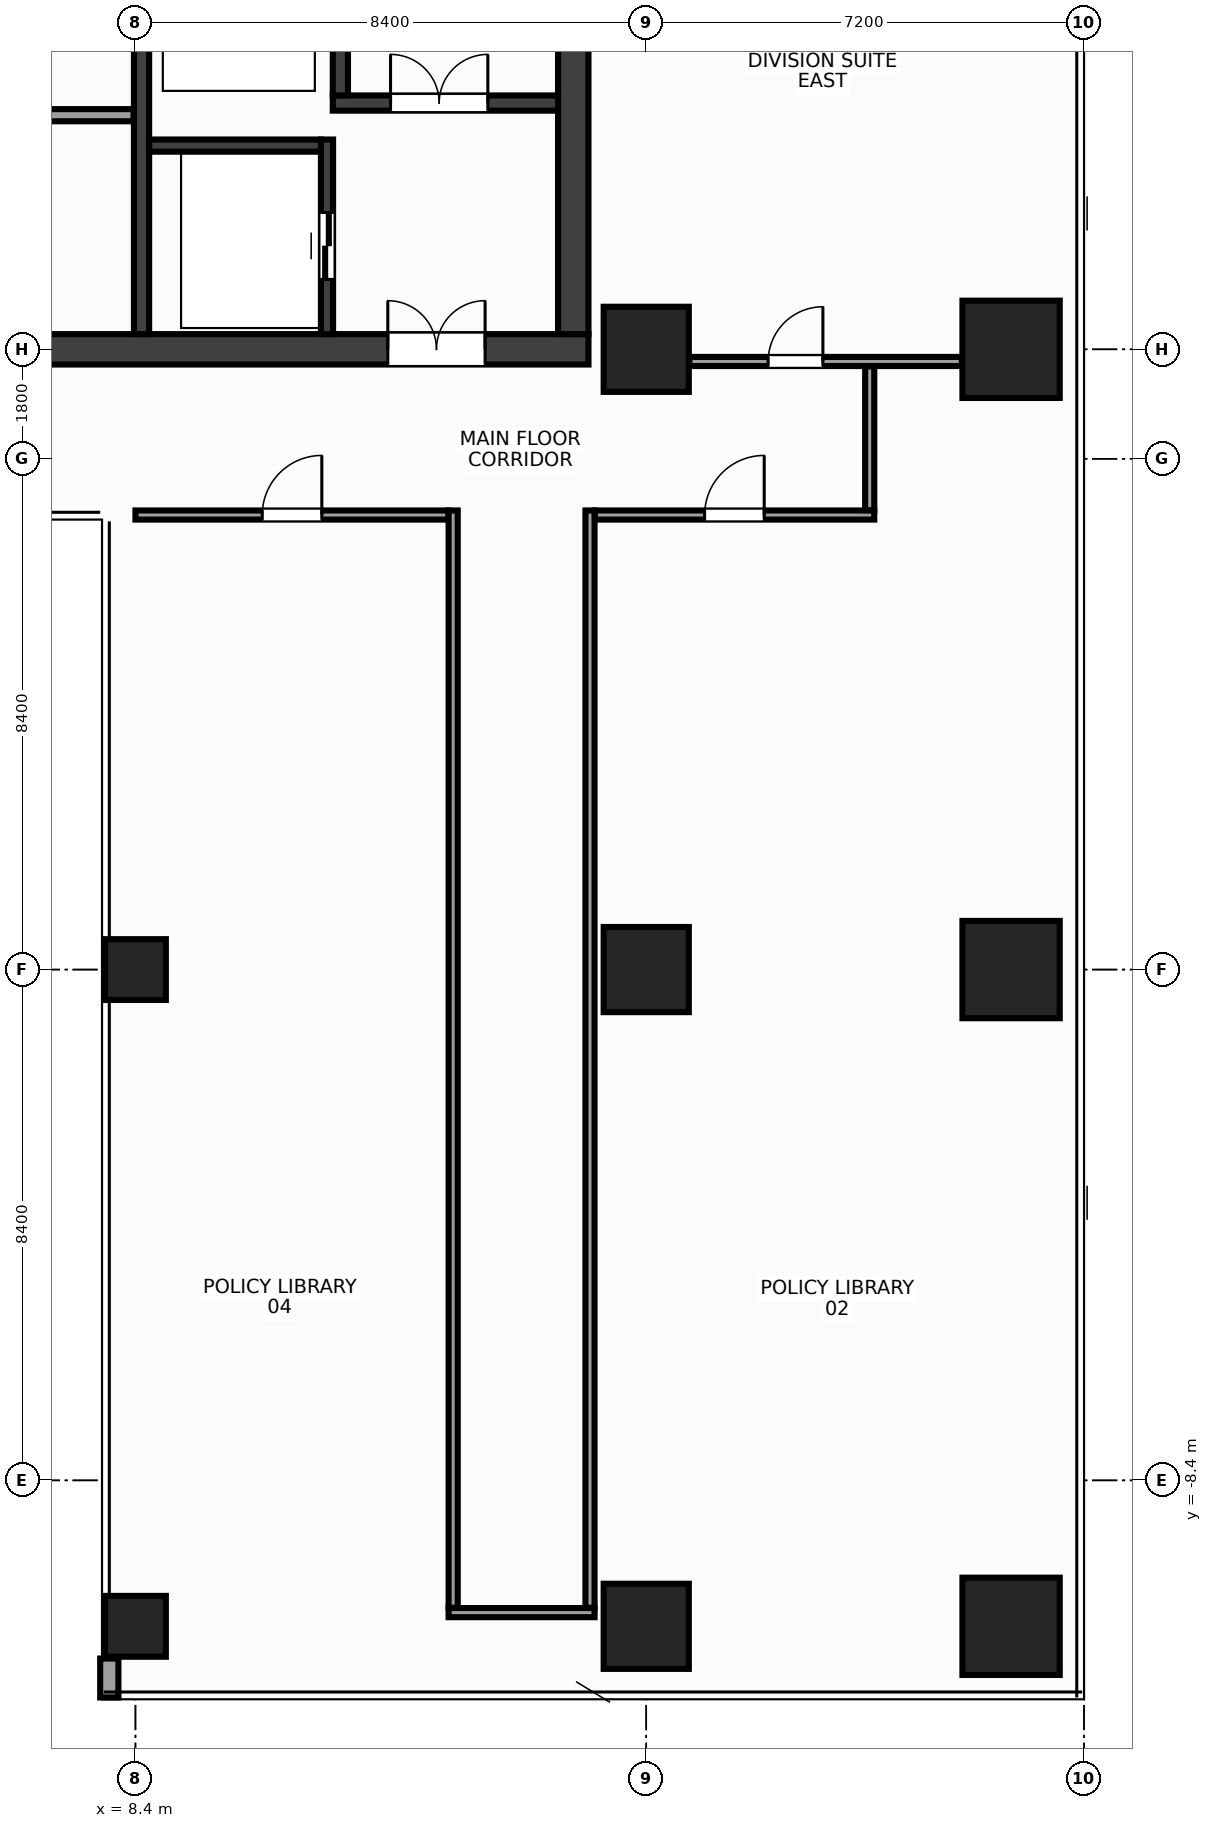
"""IFC4 building model, lengths in metres.
Left out: names, types, materials, properties, quantities, classifications, styles, units other than length and angle.
Written with IfcOpenShell. Run it as: python <this file> out.ifc"""

import sys

from ifc_helpers import new_model, si_unit, direction, frame, frame_2d, origin, origin_2d, place, context, subcontext, project, spatial, rectangle, hollow_rectangle, extrude, source, transform, mapped, element, fill, save


model = new_model("IFC4")
c1 = context("Model", 3, precision=1e-05, world=origin(), true_north=direction((0.0, 1.0)))
c2 = subcontext(c1, "Body", "Model", "MODEL_VIEW")
j1 = project(units=[si_unit("LENGTHUNIT", "METRE"), si_unit("PLANEANGLEUNIT", "RADIAN")], contexts=[c1])
p1 = place(None, origin())
s1 = spatial("IfcSite", under=j1, at=p1, CompositionType="ELEMENT")
p2 = place(p1, origin())
s2 = spatial("IfcBuilding", under=s1, at=p2, CompositionType="ELEMENT")
p3 = place(p2, frame((0.0, 0.0, 214.4)))
s3 = spatial("IfcBuildingStorey", under=s2, at=p3, CompositionType="ELEMENT", Elevation=214.4)
m1 = source(origin(), c2, "Body", "SweptSolid", [
    extrude(rectangle(XDim=31.7, YDim=0.5, at=frame_2d((15.85, 0.0))), origin(), (0.0, 0.0, 1.0), 3.6),
])
p4 = place(p3, frame((-15.85, 10.2, 0.0), z_axis=(0.0, 0.0, 1.0), x_axis=(1.0, 0.0, 0.0)))
e1 = element("IfcWall", 1, at=p4, inside=s3, PredefinedType="SHEAR", context=c2, shape_type="MappedRepresentation", body=[
    mapped(m1, transform((0.0, 0.0, 0.0), x_axis=(1.0, 0.0, 0.0), y_axis=(0.0, 1.0, 0.0), z_axis=(0.0, 0.0, 1.0), scale=1.0)),
])
p5 = place(p4, frame((1.7, 0.0, 0.0)))
e2 = element("IfcOpeningElement", 2, at=p5, cuts=e1, PredefinedType="OPENING", context=c2, shape_type="SweptSolid", body=[
    extrude(rectangle(XDim=1.6, YDim=2.15, at=frame_2d((0.8, 1.075))), frame((0.0, 0.262, 0.0), z_axis=(0.0, -1.0, 0.0), x_axis=(1.0, 0.0, 0.0)), (0.0, 0.0, 1.0), 0.524),
])
p6 = place(p4, frame((28.4, 0.0, 0.0)))
e3 = element("IfcOpeningElement", 3, at=p6, cuts=e1, PredefinedType="OPENING", context=c2, shape_type="SweptSolid", body=[
    extrude(rectangle(XDim=1.6, YDim=2.15, at=frame_2d((0.8, 1.075))), frame((0.0, 0.262, 0.0), z_axis=(0.0, -1.0, 0.0), x_axis=(1.0, 0.0, 0.0)), (0.0, 0.0, 1.0), 0.524),
])
p7 = place(p4, frame((15.1, 0.0, 0.0)))
e4 = element("IfcOpeningElement", 4, at=p7, cuts=e1, PredefinedType="OPENING", context=c2, shape_type="SweptSolid", body=[
    extrude(rectangle(XDim=1.5, YDim=2.2, at=frame_2d((0.75, 1.1))), frame((0.0, 0.262, 0.0), z_axis=(0.0, -1.0, 0.0), x_axis=(1.0, 0.0, 0.0)), (0.0, 0.0, 1.0), 0.524),
])
m2 = source(origin(), c2, "Body", "SweptSolid", [
    extrude(rectangle(XDim=13.1, YDim=0.5, at=frame_2d((6.55, 0.0))), origin(), (0.0, 0.0, 1.0), 3.6),
])
p8 = place(p3, frame((15.6, 10.45, 0.0), z_axis=(0.0, 0.0, 1.0), x_axis=(0.0, 1.0, 0.0)))
e5 = element("IfcWall", 5, at=p8, inside=s3, PredefinedType="SHEAR", context=c2, shape_type="MappedRepresentation", body=[
    mapped(m2, transform((0.0, 0.0, 0.0), x_axis=(1.0, 0.0, 0.0), y_axis=(0.0, 1.0, 0.0), z_axis=(0.0, 0.0, 1.0), scale=1.0)),
])
m3 = source(origin(), c2, "Body", "SweptSolid", [
    extrude(rectangle(XDim=13.1, YDim=0.25, at=frame_2d((6.55, 0.0))), origin(), (0.0, 0.0, 1.0), 3.6),
])
p9 = place(p3, frame((8.5, 10.45, 0.0), z_axis=(0.0, 0.0, 1.0), x_axis=(0.0, 1.0, 0.0)))
e6 = element("IfcWall", 6, at=p9, inside=s3, PredefinedType="SHEAR", context=c2, shape_type="MappedRepresentation", body=[
    mapped(m3, transform((0.0, 0.0, 0.0), x_axis=(1.0, 0.0, 0.0), y_axis=(0.0, 1.0, 0.0), z_axis=(0.0, 0.0, 1.0), scale=1.0)),
])
p10 = place(p9, frame((10.0, 0.0, 0.0)))
e7 = element("IfcOpeningElement", 7, at=p10, cuts=e6, PredefinedType="OPENING", context=c2, shape_type="SweptSolid", body=[
    extrude(rectangle(XDim=0.95, YDim=2.15, at=frame_2d((0.475, 1.075))), frame((0.0, 0.137, 0.0), z_axis=(0.0, -1.0, 0.0), x_axis=(1.0, 0.0, 0.0)), (0.0, 0.0, 1.0), 0.274),
])
m4 = source(origin(), c2, "Body", "SweptSolid", [
    extrude(rectangle(XDim=3.705, YDim=0.25, at=frame_2d((1.853, 0.0))), origin(), (0.0, 0.0, 1.0), 3.6),
])
p11 = place(p3, frame((11.645, 14.25, 0.0), z_axis=(0.0, 0.0, 1.0), x_axis=(1.0, 0.0, 0.0)))
e8 = element("IfcWall", 8, at=p11, inside=s3, PredefinedType="SHEAR", context=c2, shape_type="MappedRepresentation", body=[
    mapped(m4, transform((0.0, 0.0, 0.0), x_axis=(1.0, 0.0, 0.0), y_axis=(0.0, 1.0, 0.0), z_axis=(0.0, 0.0, 1.0), scale=1.0)),
])
p12 = place(p11, frame((0.95, 0.0, 0.0)))
e9 = element("IfcOpeningElement", 9, at=p12, cuts=e8, PredefinedType="OPENING", context=c2, shape_type="SweptSolid", body=[
    extrude(rectangle(XDim=1.6, YDim=2.15, at=frame_2d((0.8, 1.075))), frame((0.0, 0.137, 0.0), z_axis=(0.0, -1.0, 0.0), x_axis=(1.0, 0.0, 0.0)), (0.0, 0.0, 1.0), 0.274),
])
m5 = source(origin(), c2, "Body", "SweptSolid", [
    extrude(rectangle(XDim=9.175, YDim=0.25, at=frame_2d((4.587, 0.0))), origin(), (0.0, 0.0, 1.0), 3.6),
])
p13 = place(p3, frame((11.77, 14.375, 0.0), z_axis=(0.0, 0.0, 1.0), x_axis=(0.0, 1.0, 0.0)))
e10 = element("IfcWall", 10, at=p13, inside=s3, PredefinedType="SHEAR", context=c2, shape_type="MappedRepresentation", body=[
    mapped(m5, transform((0.0, 0.0, 0.0), x_axis=(1.0, 0.0, 0.0), y_axis=(0.0, 1.0, 0.0), z_axis=(0.0, 0.0, 1.0), scale=1.0)),
])
m6 = source(origin(), c2, "Body", "SweptSolid", [
    extrude(rectangle(XDim=3.2, YDim=0.2, at=frame_2d((1.6, 0.0))), origin(), (0.0, 0.0, 1.0), 3.6),
])
p14 = place(p3, frame((11.55, 10.45, 0.0), z_axis=(0.0, 0.0, 1.0), x_axis=(0.0, 1.0, 0.0)))
e11 = element("IfcWall", 11, at=p14, inside=s3, PredefinedType="SHEAR", context=c2, shape_type="MappedRepresentation", body=[
    mapped(m6, transform((0.0, 0.0, 0.0), x_axis=(1.0, 0.0, 0.0), y_axis=(0.0, 1.0, 0.0), z_axis=(0.0, 0.0, 1.0), scale=1.0)),
])
p15 = place(p14, frame((0.9, 0.0, 0.0)))
e12 = element("IfcOpeningElement", 12, at=p15, cuts=e11, PredefinedType="OPENING", context=c2, shape_type="SweptSolid", body=[
    extrude(rectangle(XDim=1.1, YDim=2.15, at=frame_2d((0.55, 1.075))), frame((0.0, 0.112, 0.0), z_axis=(0.0, -1.0, 0.0), x_axis=(1.0, 0.0, 0.0)), (0.0, 0.0, 1.0), 0.224),
])
m7 = source(origin(), c2, "Body", "SweptSolid", [
    extrude(rectangle(XDim=2.825, YDim=0.2, at=frame_2d((1.413, 0.0))), origin(), (0.0, 0.0, 1.0), 3.6),
])
p16 = place(p3, frame((8.625, 13.55, 0.0), z_axis=(0.0, 0.0, 1.0), x_axis=(1.0, 0.0, 0.0)))
e13 = element("IfcWall", 13, at=p16, inside=s3, PredefinedType="SHEAR", context=c2, shape_type="MappedRepresentation", body=[
    mapped(m7, transform((0.0, 0.0, 0.0), x_axis=(1.0, 0.0, 0.0), y_axis=(0.0, 1.0, 0.0), z_axis=(0.0, 0.0, 1.0), scale=1.0)),
])
m8 = source(origin(), c2, "Body", "SweptSolid", [
    extrude(rectangle(XDim=1.4, YDim=1.4, at=origin_2d()), origin(), (0.0, 0.0, 1.0), 3.6),
])
for number, where, z_axis, x_axis in (
    (14, (16.8, -10.8, 0.0), (0.0, 0.0, 1.0), (1.0, 0.0, 0.0)),
    (15, (16.8, 0.0, 0.0), (0.0, 0.0, 1.0), (1.0, 0.0, 0.0)),
    (16, (16.8, 10.2, 0.0), (0.0, 0.0, 1.0), (1.0, 0.0, 0.0)),
):
    element("IfcColumn", number, at=place(p3, frame(where, z_axis=z_axis, x_axis=x_axis)), inside=s3, PredefinedType="COLUMN", context=c2, shape_type="MappedRepresentation", body=[
        mapped(m8, transform((0.0, 0.0, 0.0), x_axis=(1.0, 0.0, 0.0), y_axis=(0.0, 1.0, 0.0), z_axis=(0.0, 0.0, 1.0), scale=1.0)),
    ])
m9 = source(origin(), c2, "Body", "SweptSolid", [
    extrude(rectangle(XDim=1.6, YDim=1.6, at=origin_2d()), origin(), (0.0, 0.0, 1.0), 3.6),
])
for number, where, z_axis, x_axis in (
    (17, (22.8, -10.8, 0.0), (0.0, 0.0, 1.0), (1.0, 0.0, 0.0)),
    (18, (22.8, 0.0, 0.0), (0.0, 0.0, 1.0), (1.0, 0.0, 0.0)),
    (19, (22.8, 10.2, 0.0), (0.0, 0.0, 1.0), (1.0, 0.0, 0.0)),
):
    element("IfcColumn", number, at=place(p3, frame(where, z_axis=z_axis, x_axis=x_axis)), inside=s3, PredefinedType="COLUMN", context=c2, shape_type="MappedRepresentation", body=[
        mapped(m9, transform((0.0, 0.0, 0.0), x_axis=(1.0, 0.0, 0.0), y_axis=(0.0, 1.0, 0.0), z_axis=(0.0, 0.0, 1.0), scale=1.0)),
    ])
m10 = source(origin(), c2, "Body", "SweptSolid", [
    extrude(hollow_rectangle(XDim=1.0, YDim=1.0, WallThickness=0.045, at=origin_2d()), origin(), (0.0, 0.0, 1.0), 3.6),
])
for number, where, z_axis, x_axis in (
    (20, (8.4, 0.0, 0.0), (0.0, 0.0, 1.0), (1.0, 0.0, 0.0)),
    (21, (8.4, -10.8, 0.0), (0.0, 0.0, 1.0), (1.0, 0.0, 0.0)),
):
    element("IfcColumn", number, at=place(p3, frame(where, z_axis=z_axis, x_axis=x_axis)), inside=s3, PredefinedType="COLUMN", context=c2, shape_type="MappedRepresentation", body=[
        mapped(m10, transform((0.0, 0.0, 0.0), x_axis=(1.0, 0.0, 0.0), y_axis=(0.0, 1.0, 0.0), z_axis=(0.0, 0.0, 1.0), scale=1.0)),
    ])
m11 = source(origin(), c2, "Body", "SweptSolid", [
    extrude(rectangle(XDim=0.64, YDim=0.24, at=frame_2d((0.32, 0.0))), origin(), (0.0, 0.0, 1.0), 2.76),
])
p17 = place(p3, frame((7.97, -11.33, 0.0), z_axis=(0.0, 0.0, 1.0), x_axis=(0.0, -1.0, 0.0)))
e22 = element("IfcWall", 22, at=p17, inside=s3, PredefinedType="STANDARD", context=c2, shape_type="MappedRepresentation", body=[
    mapped(m11, transform((0.0, 0.0, 0.0), x_axis=(1.0, 0.0, 0.0), y_axis=(0.0, 1.0, 0.0), z_axis=(0.0, 0.0, 1.0), scale=1.0)),
])
m12 = source(origin(), c2, "Body", "SweptSolid", [
    extrude(rectangle(XDim=7.07, YDim=0.2, at=frame_2d((3.535, 0.0))), origin(), (0.0, 0.0, 1.0), 3.38),
])
p18 = place(p3, frame((1.3, 14.05, 0.0), z_axis=(0.0, 0.0, 1.0), x_axis=(1.0, 0.0, 0.0)))
e23 = element("IfcWall", 23, at=p18, inside=s3, PredefinedType="PARTITIONING", context=c2, shape_type="MappedRepresentation", body=[
    mapped(m12, transform((0.0, 0.0, 0.0), x_axis=(1.0, 0.0, 0.0), y_axis=(0.0, 1.0, 0.0), z_axis=(0.0, 0.0, 1.0), scale=1.0)),
])
p19 = place(p18, frame((2.8, 0.0, 0.0)))
e24 = element("IfcOpeningElement", 24, at=p19, cuts=e23, PredefinedType="OPENING", context=c2, shape_type="SweptSolid", body=[
    extrude(rectangle(XDim=0.98, YDim=2.15, at=frame_2d((0.49, 1.075))), frame((0.0, 0.112, 0.0), z_axis=(0.0, -1.0, 0.0), x_axis=(1.0, 0.0, 0.0)), (0.0, 0.0, 1.0), 0.224),
])
m13 = source(origin(), c2, "Body", "SweptSolid", [
    extrude(rectangle(XDim=4.48, YDim=0.15, at=frame_2d((2.24, 0.0))), origin(), (0.0, 0.0, 1.0), 2.915),
])
p20 = place(p3, frame((17.51, 10.0, 0.0), z_axis=(0.0, 0.0, 1.0), x_axis=(1.0, 0.0, 0.0)))
e25 = element("IfcWall", 25, at=p20, inside=s3, PredefinedType="PARTITIONING", context=c2, shape_type="MappedRepresentation", body=[
    mapped(m13, transform((0.0, 0.0, 0.0), x_axis=(1.0, 0.0, 0.0), y_axis=(0.0, 1.0, 0.0), z_axis=(0.0, 0.0, 1.0), scale=1.0)),
])
p21 = place(p20, frame((1.295, 0.0, 0.0)))
e26 = element("IfcOpeningElement", 26, at=p21, cuts=e25, PredefinedType="OPENING", context=c2, shape_type="SweptSolid", body=[
    extrude(rectangle(XDim=0.9, YDim=2.15, at=frame_2d((0.45, 1.075))), frame((0.0, 0.087, 0.0), z_axis=(0.0, -1.0, 0.0), x_axis=(1.0, 0.0, 0.0)), (0.0, 0.0, 1.0), 0.174),
])
m14 = source(origin(), c2, "Body", "SweptSolid", [
    extrude(rectangle(XDim=5.15, YDim=0.15, at=frame_2d((2.575, 0.0))), origin(), (0.0, 0.0, 1.0), 3.38),
])
p22 = place(p3, frame((8.4, 7.475, 0.0), z_axis=(0.0, 0.0, 1.0), x_axis=(1.0, 0.0, 0.0)))
e27 = element("IfcWall", 27, at=p22, inside=s3, PredefinedType="PARTITIONING", context=c2, shape_type="MappedRepresentation", body=[
    mapped(m14, transform((0.0, 0.0, 0.0), x_axis=(1.0, 0.0, 0.0), y_axis=(0.0, 1.0, 0.0), z_axis=(0.0, 0.0, 1.0), scale=1.0)),
])
p23 = place(p22, frame((2.085, 0.0, 0.0)))
e28 = element("IfcOpeningElement", 28, at=p23, cuts=e27, PredefinedType="OPENING", context=c2, shape_type="SweptSolid", body=[
    extrude(rectangle(XDim=0.98, YDim=2.15, at=frame_2d((0.49, 1.075))), frame((0.0, 0.087, 0.0), z_axis=(0.0, -1.0, 0.0), x_axis=(1.0, 0.0, 0.0)), (0.0, 0.0, 1.0), 0.174),
])
m15 = source(origin(), c2, "Body", "SweptSolid", [
    extrude(rectangle(XDim=4.6, YDim=0.15, at=frame_2d((2.3, 0.0))), origin(), (0.0, 0.0, 1.0), 2.765),
])
p24 = place(p3, frame((15.95, 7.475, 0.0), z_axis=(0.0, 0.0, 1.0), x_axis=(1.0, 0.0, 0.0)))
e29 = element("IfcWall", 29, at=p24, inside=s3, PredefinedType="PARTITIONING", context=c2, shape_type="MappedRepresentation", body=[
    mapped(m15, transform((0.0, 0.0, 0.0), x_axis=(1.0, 0.0, 0.0), y_axis=(0.0, 1.0, 0.0), z_axis=(0.0, 0.0, 1.0), scale=1.0)),
])
p25 = place(p24, frame((1.81, 0.0, 0.0)))
e30 = element("IfcOpeningElement", 30, at=p25, cuts=e29, PredefinedType="OPENING", context=c2, shape_type="SweptSolid", body=[
    extrude(rectangle(XDim=0.98, YDim=2.15, at=frame_2d((0.49, 1.075))), frame((0.0, 0.087, 0.0), z_axis=(0.0, -1.0, 0.0), x_axis=(1.0, 0.0, 0.0)), (0.0, 0.0, 1.0), 0.174),
])
m16 = source(origin(), c2, "Body", "SweptSolid", [
    extrude(rectangle(XDim=2.4, YDim=0.15, at=frame_2d((1.2, 0.0))), origin(), (0.0, 0.0, 1.0), 2.915),
])
p26 = place(p3, frame((13.55, -10.575, 0.0), z_axis=(0.0, 0.0, 1.0), x_axis=(1.0, 0.0, 0.0)))
e31 = element("IfcWall", 31, at=p26, inside=s3, PredefinedType="PARTITIONING", context=c2, shape_type="MappedRepresentation", body=[
    mapped(m16, transform((0.0, 0.0, 0.0), x_axis=(1.0, 0.0, 0.0), y_axis=(0.0, 1.0, 0.0), z_axis=(0.0, 0.0, 1.0), scale=1.0)),
])
m17 = source(origin(), c2, "Body", "SweptSolid", [
    extrude(rectangle(XDim=2.365, YDim=0.15, at=frame_2d((1.183, 0.0))), origin(), (0.0, 0.0, 1.0), 3.38),
])
p27 = place(p3, frame((20.475, 7.555, 0.0), z_axis=(0.0, 0.0, 1.0), x_axis=(0.0, 1.0, 0.0)))
e32 = element("IfcWall", 32, at=p27, inside=s3, PredefinedType="PARTITIONING", context=c2, shape_type="MappedRepresentation", body=[
    mapped(m17, transform((0.0, 0.0, 0.0), x_axis=(1.0, 0.0, 0.0), y_axis=(0.0, 1.0, 0.0), z_axis=(0.0, 0.0, 1.0), scale=1.0)),
])
m18 = source(origin(), c2, "Body", "SweptSolid", [
    extrude(rectangle(XDim=18.045, YDim=0.15, at=frame_2d((9.022, 0.0))), origin(), (0.0, 0.0, 1.0), 2.915),
])
for number, where, z_axis, x_axis in (
    (33, (13.625, -10.495, 0.0), (0.0, 0.0, 1.0), (0.0, 1.0, 0.0)),
    (34, (15.875, -10.495, 0.0), (0.0, 0.0, 1.0), (0.0, 1.0, 0.0)),
):
    element("IfcWall", number, at=place(p3, frame(where, z_axis=z_axis, x_axis=x_axis)), inside=s3, PredefinedType="PARTITIONING", context=c2, shape_type="MappedRepresentation", body=[
        mapped(m18, transform((0.0, 0.0, 0.0), x_axis=(1.0, 0.0, 0.0), y_axis=(0.0, 1.0, 0.0), z_axis=(0.0, 0.0, 1.0), scale=1.0)),
    ])
m19 = source(origin(), c2, "Body", "SweptSolid", [
    extrude(rectangle(XDim=1.6, YDim=2.15, at=frame_2d((0.8, 1.075))), frame((0.0, 0.025, 0.0), z_axis=(0.0, -1.0, 0.0), x_axis=(1.0, 0.0, 0.0)), (0.0, 0.0, 1.0), 0.05),
])
p28 = place(p12, origin())
e35 = element("IfcDoor", 35, at=p28, inside=s3, OperationType="DOUBLE_DOOR_SINGLE_SWING", PredefinedType="DOOR", context=c2, shape_type="MappedRepresentation", body=[
    mapped(m19, transform((0.0, 0.0, 0.0), x_axis=(1.0, 0.0, 0.0), y_axis=(0.0, 1.0, 0.0), z_axis=(0.0, 0.0, 1.0), scale=1.0)),
])
fill(e9, e35)
p29 = place(p6, origin())
e36 = element("IfcDoor", 36, at=p29, inside=s3, OperationType="DOUBLE_DOOR_SINGLE_SWING", PredefinedType="DOOR", context=c2, shape_type="MappedRepresentation", body=[
    mapped(m19, transform((0.0, 0.0, 0.0), x_axis=(1.0, 0.0, 0.0), y_axis=(0.0, 1.0, 0.0), z_axis=(0.0, 0.0, 1.0), scale=1.0)),
])
fill(e3, e36)
m20 = source(origin(), c2, "Body", "SweptSolid", [
    extrude(rectangle(XDim=1.1, YDim=2.15, at=frame_2d((0.55, 1.075))), frame((0.0, 0.025, 0.0), z_axis=(0.0, -1.0, 0.0), x_axis=(1.0, 0.0, 0.0)), (0.0, 0.0, 1.0), 0.05),
])
p30 = place(p15, origin())
e37 = element("IfcDoor", 37, at=p30, inside=s3, OperationType="DOUBLE_DOOR_SLIDING", PredefinedType="DOOR", context=c2, shape_type="MappedRepresentation", body=[
    mapped(m20, transform((0.0, 0.0, 0.0), x_axis=(1.0, 0.0, 0.0), y_axis=(0.0, 1.0, 0.0), z_axis=(0.0, 0.0, 1.0), scale=1.0)),
])
fill(e12, e37)
m21 = source(origin(), c2, "Body", "SweptSolid", [
    extrude(rectangle(XDim=0.9, YDim=2.15, at=frame_2d((0.45, 1.075))), frame((0.0, 0.025, 0.0), z_axis=(0.0, -1.0, 0.0), x_axis=(1.0, 0.0, 0.0)), (0.0, 0.0, 1.0), 0.05),
])
p31 = place(p21, origin())
e38 = element("IfcDoor", 38, at=p31, inside=s3, OperationType="SINGLE_SWING_RIGHT", PredefinedType="DOOR", context=c2, shape_type="MappedRepresentation", body=[
    mapped(m21, transform((0.0, 0.0, 0.0), x_axis=(1.0, 0.0, 0.0), y_axis=(0.0, 1.0, 0.0), z_axis=(0.0, 0.0, 1.0), scale=1.0)),
])
fill(e26, e38)
m22 = source(origin(), c2, "Body", "SweptSolid", [
    extrude(rectangle(XDim=0.98, YDim=2.15, at=frame_2d((0.49, 1.075))), frame((0.0, 0.025, 0.0), z_axis=(0.0, -1.0, 0.0), x_axis=(1.0, 0.0, 0.0)), (0.0, 0.0, 1.0), 0.05),
])
p32 = place(p25, origin())
e39 = element("IfcDoor", 39, at=p32, inside=s3, OperationType="SINGLE_SWING_RIGHT", PredefinedType="DOOR", context=c2, shape_type="MappedRepresentation", body=[
    mapped(m22, transform((0.0, 0.0, 0.0), x_axis=(1.0, 0.0, 0.0), y_axis=(0.0, 1.0, 0.0), z_axis=(0.0, 0.0, 1.0), scale=1.0)),
])
fill(e30, e39)
p33 = place(p23, origin())
e40 = element("IfcDoor", 40, at=p33, inside=s3, OperationType="SINGLE_SWING_RIGHT", PredefinedType="DOOR", context=c2, shape_type="MappedRepresentation", body=[
    mapped(m22, transform((0.0, 0.0, 0.0), x_axis=(1.0, 0.0, 0.0), y_axis=(0.0, 1.0, 0.0), z_axis=(0.0, 0.0, 1.0), scale=1.0)),
])
fill(e28, e40)
save(model, sys.argv[1])
